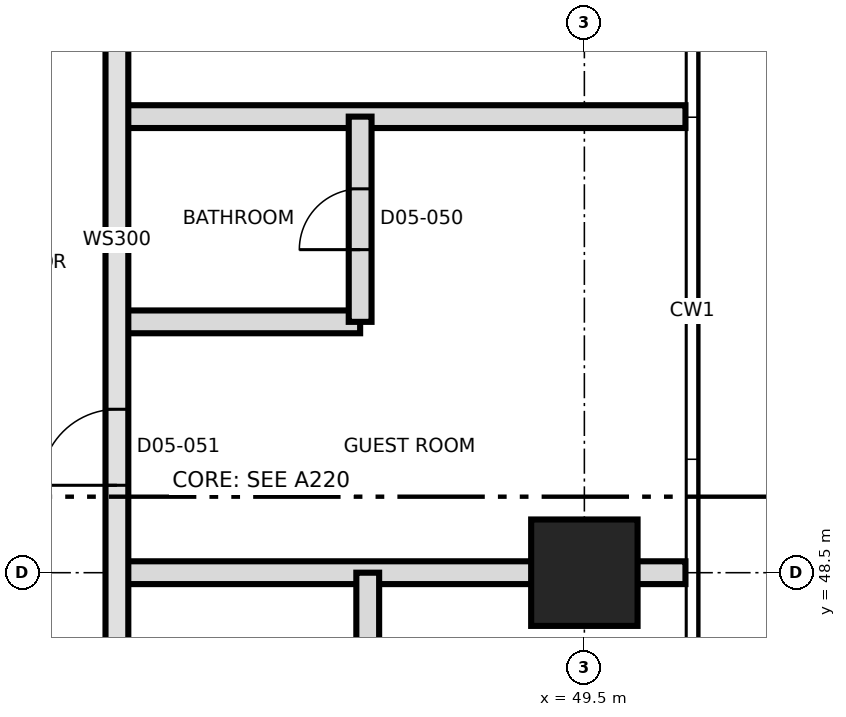
"""IFC4 building model, lengths in metres.
Left out: names, types, materials, properties, quantities, classifications, styles, units other than length and angle.
Written with IfcOpenShell. Run it as: python <this file> out.ifc"""

import sys

from ifc_helpers import new_model, si_unit, direction, frame, frame_2d, origin, origin_2d, place, context, subcontext, project, spatial, rectangle, extrude, element, fill, save


model = new_model("IFC4")
c1 = context("Model", 3, precision=1e-05, world=origin(), true_north=direction((0.0, 1.0)))
c2 = subcontext(c1, "Body", "Model", "MODEL_VIEW")
j1 = project(units=[si_unit("LENGTHUNIT", "METRE"), si_unit("PLANEANGLEUNIT", "RADIAN")], contexts=[c1])
p1 = place(None, origin())
s1 = spatial("IfcSite", under=j1, at=p1, CompositionType="ELEMENT")
p2 = place(p1, origin())
s2 = spatial("IfcBuilding", under=s1, at=p2, CompositionType="ELEMENT")
p3 = place(p2, frame((0.0, 0.0, 74.2)))
s3 = spatial("IfcBuildingStorey", under=s2, at=p3, CompositionType="ELEMENT", Elevation=74.2)
p4 = place(p3, frame((49.5, 48.5, 0.0), z_axis=(0.0, 0.0, 1.0), x_axis=(1.0, 0.0, 0.0)))
e1 = element("IfcColumn", 1, at=p4, inside=s3, PredefinedType="COLUMN", context=c2, shape_type="SweptSolid", body=[
    extrude(rectangle(XDim=1.4, YDim=1.4, at=origin_2d()), origin(), (0.0, 0.0, 1.0), 3.7),
])
p5 = place(p3, frame((43.35, 48.5, 0.0), z_axis=(0.0, 0.0, 1.0), x_axis=(1.0, 0.0, 0.0)))
e2 = element("IfcWall", 2, at=p5, inside=s3, PredefinedType="PARTITIONING", context=c2, shape_type="SweptSolid", body=[
    extrude(rectangle(XDim=7.48, YDim=0.3, at=frame_2d((3.74, 0.0))), origin(), (0.0, 0.0, 1.0), 3.4),
])
p6 = place(p3, frame((43.35, 51.8, 0.0), z_axis=(0.0, 0.0, 1.0), x_axis=(1.0, 0.0, 0.0)))
e3 = element("IfcWall", 3, at=p6, inside=s3, PredefinedType="PARTITIONING", context=c2, shape_type="SweptSolid", body=[
    extrude(rectangle(XDim=3.2, YDim=0.3, at=frame_2d((1.6, 0.0))), origin(), (0.0, 0.0, 1.0), 3.4),
])
p7 = place(p3, frame((43.35, 54.5, 0.0), z_axis=(0.0, 0.0, 1.0), x_axis=(1.0, 0.0, 0.0)))
e4 = element("IfcWall", 4, at=p7, inside=s3, PredefinedType="PARTITIONING", context=c2, shape_type="SweptSolid", body=[
    extrude(rectangle(XDim=7.48, YDim=0.3, at=frame_2d((3.74, 0.0))), origin(), (0.0, 0.0, 1.0), 3.4),
])
p8 = place(p3, frame((43.35, 39.95, 0.0), z_axis=(0.0, 0.0, 1.0), x_axis=(0.0, 1.0, 0.0)))
e5 = element("IfcWall", 5, at=p8, inside=s3, PredefinedType="SOLIDWALL", context=c2, shape_type="SweptSolid", body=[
    extrude(rectangle(XDim=25.85, YDim=0.3, at=frame_2d((12.925, 0.0))), origin(), (0.0, 0.0, 1.0), 3.4),
])
p9 = place(p8, frame((3.55, 0.0, 0.0)))
e6 = element("IfcOpeningElement", 6, at=p9, cuts=e5, PredefinedType="OPENING", context=c2, shape_type="SweptSolid", body=[
    extrude(rectangle(XDim=1.0, YDim=2.4, at=frame_2d((0.5, 1.2))), frame((0.0, 0.16, 0.0), z_axis=(0.0, -1.0, 0.0), x_axis=(1.0, 0.0, 0.0)), (0.0, 0.0, 1.0), 0.32),
])
p10 = place(p8, frame((9.7, 0.0, 0.0)))
e7 = element("IfcOpeningElement", 7, at=p10, cuts=e5, PredefinedType="OPENING", context=c2, shape_type="SweptSolid", body=[
    extrude(rectangle(XDim=1.0, YDim=2.1, at=frame_2d((0.5, 1.05))), frame((0.0, 0.16, 0.0), z_axis=(0.0, -1.0, 0.0), x_axis=(1.0, 0.0, 0.0)), (0.0, 0.0, 1.0), 0.32),
])
p11 = place(p8, frame((15.55, 0.0, 0.0)))
e8 = element("IfcOpeningElement", 8, at=p11, cuts=e5, PredefinedType="OPENING", context=c2, shape_type="SweptSolid", body=[
    extrude(rectangle(XDim=1.0, YDim=2.1, at=frame_2d((0.5, 1.05))), frame((0.0, 0.16, 0.0), z_axis=(0.0, -1.0, 0.0), x_axis=(1.0, 0.0, 0.0)), (0.0, 0.0, 1.0), 0.32),
])
p12 = place(p8, frame((21.1, 0.0, 0.0)))
e9 = element("IfcOpeningElement", 9, at=p12, cuts=e5, PredefinedType="OPENING", context=c2, shape_type="SweptSolid", body=[
    extrude(rectangle(XDim=1.0, YDim=2.4, at=frame_2d((0.5, 1.2))), frame((0.0, 0.16, 0.0), z_axis=(0.0, -1.0, 0.0), x_axis=(1.0, 0.0, 0.0)), (0.0, 0.0, 1.0), 0.32),
])
p13 = place(p3, frame((46.55, 51.8, 0.0), z_axis=(0.0, 0.0, 1.0), x_axis=(0.0, 1.0, 0.0)))
e10 = element("IfcWall", 10, at=p13, inside=s3, PredefinedType="PARTITIONING", context=c2, shape_type="SweptSolid", body=[
    extrude(rectangle(XDim=2.7, YDim=0.3, at=frame_2d((1.35, 0.0))), origin(), (0.0, 0.0, 1.0), 3.4),
])
p14 = place(p13, frame((0.95, 0.0, 0.0)))
e11 = element("IfcOpeningElement", 11, at=p14, cuts=e10, PredefinedType="OPENING", context=c2, shape_type="SweptSolid", body=[
    extrude(rectangle(XDim=0.8, YDim=2.1, at=frame_2d((0.4, 1.05))), frame((0.0, 0.16, 0.0), z_axis=(0.0, -1.0, 0.0), x_axis=(1.0, 0.0, 0.0)), (0.0, 0.0, 1.0), 0.32),
])
p15 = place(p3, frame((46.65, 45.5, 0.0), z_axis=(0.0, 0.0, 1.0), x_axis=(0.0, 1.0, 0.0)))
e12 = element("IfcWall", 12, at=p15, inside=s3, PredefinedType="PARTITIONING", context=c2, shape_type="SweptSolid", body=[
    extrude(rectangle(XDim=3.0, YDim=0.3, at=frame_2d((1.5, 0.0))), origin(), (0.0, 0.0, 1.0), 3.4),
])
p16 = place(p15, frame((1.1, 0.0, 0.0)))
e13 = element("IfcOpeningElement", 13, at=p16, cuts=e12, PredefinedType="OPENING", context=c2, shape_type="SweptSolid", body=[
    extrude(rectangle(XDim=0.8, YDim=2.1, at=frame_2d((0.4, 1.05))), frame((0.0, 0.16, 0.0), z_axis=(0.0, -1.0, 0.0), x_axis=(1.0, 0.0, 0.0)), (0.0, 0.0, 1.0), 0.32),
])
p17 = place(p14, origin())
e14 = element("IfcDoor", 14, at=p17, inside=s3, OperationType="SINGLE_SWING_LEFT", PredefinedType="DOOR", context=c2, shape_type="SweptSolid", body=[
    extrude(rectangle(XDim=0.8, YDim=2.1, at=frame_2d((0.4, 1.05))), frame((0.0, 0.025, 0.0), z_axis=(0.0, -1.0, 0.0), x_axis=(1.0, 0.0, 0.0)), (0.0, 0.0, 1.0), 0.05),
])
fill(e11, e14)
p18 = place(p10, origin())
e15 = element("IfcDoor", 15, at=p18, inside=s3, OperationType="SINGLE_SWING_LEFT", PredefinedType="DOOR", context=c2, shape_type="SweptSolid", body=[
    extrude(rectangle(XDim=1.0, YDim=2.1, at=frame_2d((0.5, 1.05))), frame((0.0, 0.025, 0.0), z_axis=(0.0, -1.0, 0.0), x_axis=(1.0, 0.0, 0.0)), (0.0, 0.0, 1.0), 0.05),
])
fill(e7, e15)
save(model, sys.argv[1])
